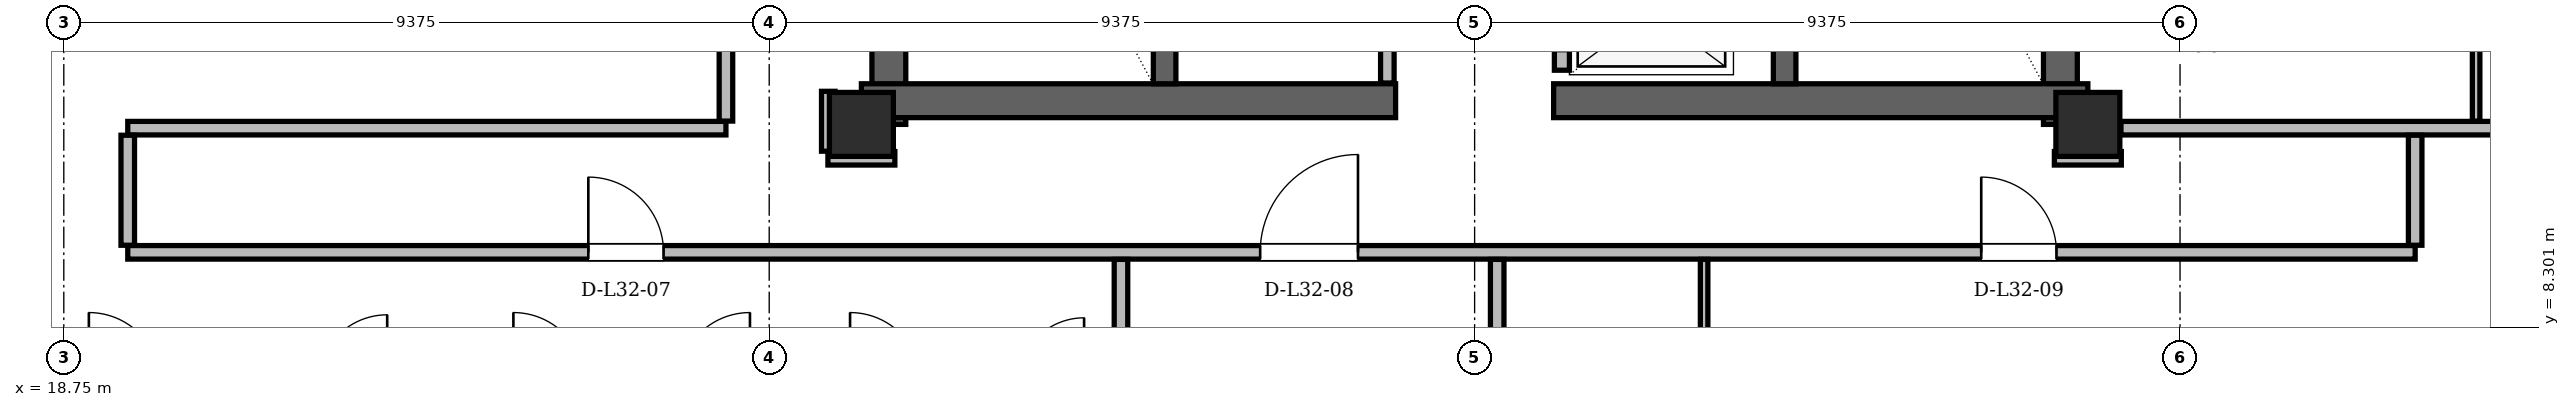
"""IFC4 building model, lengths in metres.
Left out: names, types, materials, properties, quantities, classifications, styles, units other than length and angle.
Written with IfcOpenShell. Run it as: python <this file> out.ifc"""

import sys

from ifc_helpers import new_model, si_unit, direction, frame, frame_2d, origin, origin_2d, place, context, subcontext, project, spatial, rectangle, hollow_rectangle, extrude, element, fill, save


model = new_model("IFC4")
c1 = context("Model", 3, precision=1e-05, world=origin(), true_north=direction((0.0, 1.0)))
c2 = subcontext(c1, "Body", "Model", "MODEL_VIEW")
j1 = project(units=[si_unit("LENGTHUNIT", "METRE"), si_unit("PLANEANGLEUNIT", "RADIAN")], contexts=[c1])
p1 = place(None, origin())
s1 = spatial("IfcSite", under=j1, at=p1, CompositionType="ELEMENT")
p2 = place(p1, origin())
s2 = spatial("IfcBuilding", under=s1, at=p2, CompositionType="ELEMENT")
p3 = place(p2, frame((0.0, 0.0, 123.0)))
s3 = spatial("IfcBuildingStorey", under=s2, at=p3, CompositionType="ELEMENT", Elevation=123.0)
for number, where, z_axis, x_axis in (
    (1, (29.35, 11.0, 0.0), (0.0, 0.0, 1.0), (1.0, 0.0, 0.0)),
    (2, (45.65, 11.0, 0.0), (0.0, 0.0, 1.0), (1.0, 0.0, 0.0)),
):
    element("IfcColumn", number, at=place(p3, frame(where, z_axis=z_axis, x_axis=x_axis)), inside=s3, PredefinedType="COLUMN", context=c2, shape_type="SweptSolid", body=[
        extrude(hollow_rectangle(XDim=0.85, YDim=0.85, WallThickness=0.07, at=origin_2d()), origin(), (0.0, 0.0, 1.0), 3.6),
    ])
for number, where, z_axis, x_axis in (
    (3, (29.715, 11.0, 0.0), (0.0, 0.0, 1.0), (0.0, 1.0, 0.0)),
    (4, (45.285, 11.0, 0.0), (0.0, 0.0, 1.0), (0.0, 1.0, 0.0)),
):
    element("IfcWall", number, at=place(p3, frame(where, z_axis=z_axis, x_axis=x_axis)), inside=s3, PredefinedType="SHEAR", context=c2, shape_type="SweptSolid", body=[
        extrude(rectangle(XDim=13.3, YDim=0.45, at=frame_2d((6.65, 0.0))), origin(), (0.0, 0.0, 1.0), 3.36),
    ])
for number, where, z_axis, x_axis in (
    (5, (29.35, 11.315, 0.0), (0.0, 0.0, 1.0), (1.0, 0.0, 0.0)),
    (6, (38.55, 11.315, 0.0), (0.0, 0.0, 1.0), (1.0, 0.0, 0.0)),
):
    element("IfcWall", number, at=place(p3, frame(where, z_axis=z_axis, x_axis=x_axis)), inside=s3, PredefinedType="SHEAR", context=c2, shape_type="SweptSolid", body=[
        extrude(rectangle(XDim=7.1, YDim=0.45, at=frame_2d((3.55, 0.0))), origin(), (0.0, 0.0, 1.0), 3.36),
    ])
for number, where, z_axis, x_axis in (
    (7, (33.38, 11.54, 0.0), (0.0, 0.0, 1.0), (0.0, 1.0, 0.0)),
    (8, (41.62, 11.54, 0.0), (0.0, 0.0, 1.0), (0.0, 1.0, 0.0)),
):
    element("IfcWall", number, at=place(p3, frame(where, z_axis=z_axis, x_axis=x_axis)), inside=s3, PredefinedType="SHEAR", context=c2, shape_type="SweptSolid", body=[
        extrude(rectangle(XDim=7.62, YDim=0.3, at=frame_2d((3.81, 0.0))), origin(), (0.0, 0.0, 1.0), 3.36),
    ])
p4 = place(p3, frame((14.636, 13.107, 0.0), z_axis=(0.0, 0.0, 1.0), x_axis=(0.500010095722, -0.866019574938, 0.0)))
e9 = element("IfcWall", 9, at=p4, inside=s3, PredefinedType="SOLIDWALL", context=c2, shape_type="SweptSolid", body=[
    extrude(rectangle(XDim=10.751, YDim=0.34, at=frame_2d((5.375, 0.0))), origin(), (0.0, 0.0, 1.0), 2.578),
])
p5 = place(p3, frame((36.34, 11.55, 0.0), z_axis=(0.0, 0.0, 1.0), x_axis=(0.0, 1.0, 0.0)))
e10 = element("IfcWall", 10, at=p5, inside=s3, PredefinedType="PARTITIONING", context=c2, shape_type="SweptSolid", body=[
    extrude(rectangle(XDim=5.55, YDim=0.18, at=frame_2d((2.775, 0.0))), origin(), (0.0, 0.0, 1.0), 3.36),
])
p6 = place(p5, frame((2.85, 0.0, 0.0)))
e11 = element("IfcOpeningElement", 11, at=p6, cuts=e10, PredefinedType="OPENING", context=c2, shape_type="SweptSolid", body=[
    extrude(rectangle(XDim=0.95, YDim=2.1, at=frame_2d((0.475, 1.05))), frame((0.0, 0.09, 0.0), z_axis=(0.0, -1.0, 0.0), x_axis=(1.0, 0.0, 0.0)), (0.0, 0.0, 1.0), 0.18),
])
p7 = place(p3, frame((38.66, 11.72, 0.0), z_axis=(0.0, 0.0, 1.0), x_axis=(0.0, 1.0, 0.0)))
e12 = element("IfcWall", 12, at=p7, inside=s3, PredefinedType="PARTITIONING", context=c2, shape_type="SweptSolid", body=[
    extrude(rectangle(XDim=9.1, YDim=0.2, at=frame_2d((4.55, 0.0))), origin(), (0.0, 0.0, 1.0), 3.36),
])
p8 = place(p7, frame((0.255, 0.0, 0.0)))
e13 = element("IfcOpeningElement", 13, at=p8, cuts=e12, PredefinedType="OPENING", context=c2, shape_type="SweptSolid", body=[
    extrude(rectangle(XDim=1.05, YDim=2.15, at=frame_2d((0.525, 1.075))), frame((0.0, 0.1, 0.0), z_axis=(0.0, -1.0, 0.0), x_axis=(1.0, 0.0, 0.0)), (0.0, 0.0, 1.0), 0.2),
])
p9 = place(p7, frame((2.105, 0.0, 0.0)))
e14 = element("IfcOpeningElement", 14, at=p9, cuts=e12, PredefinedType="OPENING", context=c2, shape_type="SweptSolid", body=[
    extrude(rectangle(XDim=1.05, YDim=2.15, at=frame_2d((0.525, 1.075))), frame((0.0, 0.1, 0.0), z_axis=(0.0, -1.0, 0.0), x_axis=(1.0, 0.0, 0.0)), (0.0, 0.0, 1.0), 0.2),
])
p10 = place(p7, frame((3.955, 0.0, 0.0)))
e15 = element("IfcOpeningElement", 15, at=p10, cuts=e12, PredefinedType="OPENING", context=c2, shape_type="SweptSolid", body=[
    extrude(rectangle(XDim=1.05, YDim=2.15, at=frame_2d((0.525, 1.075))), frame((0.0, 0.1, 0.0), z_axis=(0.0, -1.0, 0.0), x_axis=(1.0, 0.0, 0.0)), (0.0, 0.0, 1.0), 0.2),
])
p11 = place(p3, frame((19.6, 9.3, 0.0), z_axis=(0.0, 0.0, 1.0), x_axis=(1.0, 0.0, 0.0)))
e16 = element("IfcWall", 16, at=p11, inside=s3, PredefinedType="PARTITIONING", context=c2, shape_type="SweptSolid", body=[
    extrude(rectangle(XDim=30.4, YDim=0.18, at=frame_2d((15.2, 0.0))), origin(), (0.0, 0.0, 1.0), 2.814),
])
p12 = place(p11, frame((6.121, 0.0, 0.0)))
e17 = element("IfcOpeningElement", 17, at=p12, cuts=e16, PredefinedType="OPENING", context=c2, shape_type="SweptSolid", body=[
    extrude(rectangle(XDim=1.0, YDim=2.18, at=frame_2d((0.5, 1.09))), frame((0.0, 0.09, 0.0), z_axis=(0.0, -1.0, 0.0), x_axis=(1.0, 0.0, 0.0)), (0.0, 0.0, 1.0), 0.18),
])
p13 = place(p11, frame((15.05, 0.0, 0.0)))
e18 = element("IfcOpeningElement", 18, at=p13, cuts=e16, PredefinedType="OPENING", context=c2, shape_type="SweptSolid", body=[
    extrude(rectangle(XDim=1.3, YDim=2.2, at=frame_2d((0.65, 1.1))), frame((0.0, 0.09, 0.0), z_axis=(0.0, -1.0, 0.0), x_axis=(1.0, 0.0, 0.0)), (0.0, 0.0, 1.0), 0.18),
])
p14 = place(p11, frame((24.633, 0.0, 0.0)))
e19 = element("IfcOpeningElement", 19, at=p14, cuts=e16, PredefinedType="OPENING", context=c2, shape_type="SweptSolid", body=[
    extrude(rectangle(XDim=1.0, YDim=2.18, at=frame_2d((0.5, 1.09))), frame((0.0, 0.09, 0.0), z_axis=(0.0, -1.0, 0.0), x_axis=(1.0, 0.0, 0.0)), (0.0, 0.0, 1.0), 0.18),
])
for number, where, z_axis, x_axis in (
    (20, (28.905, 10.55, 0.0), (0.0, 0.0, 1.0), (1.0, 0.0, 0.0)),
    (21, (45.205, 10.55, 0.0), (0.0, 0.0, 1.0), (1.0, 0.0, 0.0)),
):
    element("IfcWall", number, at=place(p3, frame(where, z_axis=z_axis, x_axis=x_axis)), inside=s3, PredefinedType="PARTITIONING", context=c2, shape_type="SweptSolid", body=[
        extrude(rectangle(XDim=0.89, YDim=0.18, at=frame_2d((0.445, 0.0))), origin(), (0.0, 0.0, 1.0), 3.36),
    ])
p15 = place(p3, frame((19.6, 10.95, 0.0), z_axis=(0.0, 0.0, 1.0), x_axis=(1.0, 0.0, 0.0)))
e22 = element("IfcWall", 22, at=p15, inside=s3, PredefinedType="PARTITIONING", context=c2, shape_type="SweptSolid", body=[
    extrude(rectangle(XDim=7.95, YDim=0.18, at=frame_2d((3.975, 0.0))), origin(), (0.0, 0.0, 1.0), 3.36),
])
p16 = place(p3, frame((46.09, 10.95, 0.0), z_axis=(0.0, 0.0, 1.0), x_axis=(1.0, 0.0, 0.0)))
e23 = element("IfcWall", 23, at=p16, inside=s3, PredefinedType="PARTITIONING", context=c2, shape_type="SweptSolid", body=[
    extrude(rectangle(XDim=12.827, YDim=0.18, at=frame_2d((6.414, 0.0))), origin(), (0.0, 0.0, 1.0), 2.814),
])
p17 = place(p3, frame((19.6, 9.394, 0.0), z_axis=(0.0, 0.0, 1.0), x_axis=(0.0, 1.0, 0.0)))
e24 = element("IfcWall", 24, at=p17, inside=s3, PredefinedType="PARTITIONING", context=c2, shape_type="SweptSolid", body=[
    extrude(rectangle(XDim=1.462, YDim=0.18, at=frame_2d((0.731, 0.0))), origin(), (0.0, 0.0, 1.0), 3.36),
])
p18 = place(p3, frame((27.55, 11.044, 0.0), z_axis=(0.0, 0.0, 1.0), x_axis=(0.0, 1.0, 0.0)))
e25 = element("IfcWall", 25, at=p18, inside=s3, PredefinedType="PARTITIONING", context=c2, shape_type="SweptSolid", body=[
    extrude(rectangle(XDim=5.662, YDim=0.18, at=frame_2d((2.831, 0.0))), origin(), (0.0, 0.0, 1.0), 2.814),
])
p19 = place(p3, frame((28.91, 10.644, 0.0), z_axis=(0.0, 0.0, 1.0), x_axis=(0.0, 1.0, 0.0)))
e26 = element("IfcWall", 26, at=p19, inside=s3, PredefinedType="PARTITIONING", context=c2, shape_type="SweptSolid", body=[
    extrude(rectangle(XDim=0.796, YDim=0.18, at=frame_2d((0.398, 0.0))), origin(), (0.0, 0.0, 1.0), 2.814),
])
p20 = place(p3, frame((32.8, 5.094, 0.0), z_axis=(0.0, 0.0, 1.0), x_axis=(0.0, 1.0, 0.0)))
e27 = element("IfcWall", 27, at=p20, inside=s3, PredefinedType="PARTITIONING", context=c2, shape_type="SweptSolid", body=[
    extrude(rectangle(XDim=4.112, YDim=0.18, at=frame_2d((2.056, 0.0))), origin(), (0.0, 0.0, 1.0), 2.946),
])
p21 = place(p3, frame((37.8, 5.094, 0.0), z_axis=(0.0, 0.0, 1.0), x_axis=(0.0, 1.0, 0.0)))
e28 = element("IfcWall", 28, at=p21, inside=s3, PredefinedType="PARTITIONING", context=c2, shape_type="SweptSolid", body=[
    extrude(rectangle(XDim=4.112, YDim=0.18, at=frame_2d((2.056, 0.0))), origin(), (0.0, 0.0, 1.0), 3.36),
])
p22 = place(p3, frame((40.55, 3.97, 0.0), z_axis=(0.0, 0.0, 1.0), x_axis=(0.0, 1.0, 0.0)))
e29 = element("IfcWall", 29, at=p22, inside=s3, PredefinedType="PARTITIONING", context=c2, shape_type="SweptSolid", body=[
    extrude(rectangle(XDim=5.236, YDim=0.1, at=frame_2d((2.618, 0.0))), origin(), (0.0, 0.0, 1.0), 3.36),
])
p23 = place(p22, frame((2.213, 0.0, 0.0)))
e30 = element("IfcOpeningElement", 30, at=p23, cuts=e29, PredefinedType="OPENING", context=c2, shape_type="SweptSolid", body=[
    extrude(rectangle(XDim=0.88, YDim=2.08, at=frame_2d((0.44, 1.04))), frame((0.0, 0.05, 0.0), z_axis=(0.0, -1.0, 0.0), x_axis=(1.0, 0.0, 0.0)), (0.0, 0.0, 1.0), 0.1),
])
p24 = place(p3, frame((50.0, 9.394, 0.0), z_axis=(0.0, 0.0, 1.0), x_axis=(0.0, 1.0, 0.0)))
e31 = element("IfcWall", 31, at=p24, inside=s3, PredefinedType="PARTITIONING", context=c2, shape_type="SweptSolid", body=[
    extrude(rectangle(XDim=1.462, YDim=0.18, at=frame_2d((0.731, 0.0))), origin(), (0.0, 0.0, 1.0), 3.36),
])
p25 = place(p3, frame((50.81, 11.044, 0.0), z_axis=(0.0, 0.0, 1.0), x_axis=(0.0, 1.0, 0.0)))
e32 = element("IfcWall", 32, at=p25, inside=s3, PredefinedType="PARTITIONING", context=c2, shape_type="SweptSolid", body=[
    extrude(rectangle(XDim=3.082, YDim=0.1, at=frame_2d((1.541, 0.0))), origin(), (0.0, 0.0, 1.0), 2.814),
])
p26 = place(p12, origin())
e33 = element("IfcDoor", 33, at=p26, inside=s3, OperationType="SINGLE_SWING_LEFT", PredefinedType="DOOR", context=c2, shape_type="SweptSolid", body=[
    extrude(rectangle(XDim=1.0, YDim=2.18, at=frame_2d((0.5, 1.09))), frame((0.0, 0.025, 0.0), z_axis=(0.0, -1.0, 0.0), x_axis=(1.0, 0.0, 0.0)), (0.0, 0.0, 1.0), 0.05),
])
fill(e17, e33)
p27 = place(p13, origin())
e34 = element("IfcDoor", 34, at=p27, inside=s3, OperationType="SINGLE_SWING_RIGHT", PredefinedType="DOOR", context=c2, shape_type="SweptSolid", body=[
    extrude(rectangle(XDim=1.3, YDim=2.2, at=frame_2d((0.65, 1.1))), frame((0.0, 0.025, 0.0), z_axis=(0.0, -1.0, 0.0), x_axis=(1.0, 0.0, 0.0)), (0.0, 0.0, 1.0), 0.05),
])
fill(e18, e34)
p28 = place(p14, origin())
e35 = element("IfcDoor", 35, at=p28, inside=s3, OperationType="SINGLE_SWING_LEFT", PredefinedType="DOOR", context=c2, shape_type="SweptSolid", body=[
    extrude(rectangle(XDim=1.0, YDim=2.18, at=frame_2d((0.5, 1.09))), frame((0.0, 0.025, 0.0), z_axis=(0.0, -1.0, 0.0), x_axis=(1.0, 0.0, 0.0)), (0.0, 0.0, 1.0), 0.05),
])
fill(e19, e35)
save(model, sys.argv[1])
